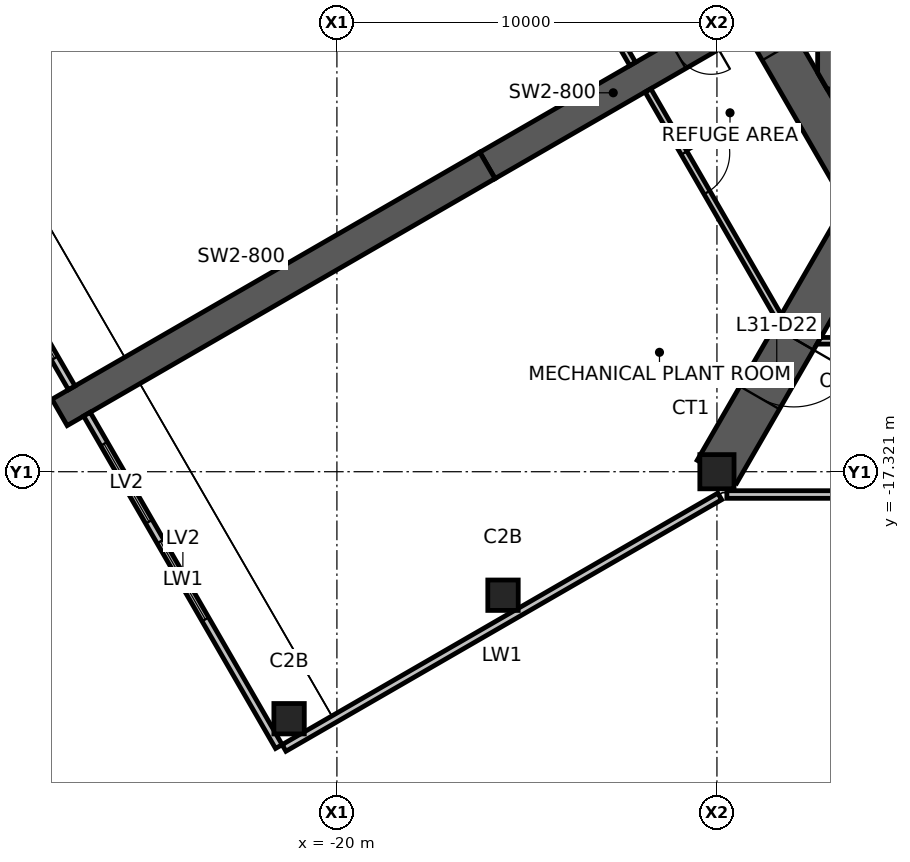
"""IFC4 building model, lengths in metres.
Left out: names, types, materials, properties, quantities, classifications, styles, units other than length and angle.
Written with IfcOpenShell. Run it as: python <this file> out.ifc"""

import sys

from ifc_helpers import new_model, si_unit, direction, frame, frame_2d, origin, origin_2d, place, context, subcontext, project, spatial, polyline, rectangle, hollow_rectangle, outline, extrude, element, fill, save


model = new_model("IFC4")
c1 = context("Model", 3, precision=1e-05, world=origin(), true_north=direction((0.0, 1.0)))
c2 = subcontext(c1, "Body", "Model", "MODEL_VIEW")
j1 = project(units=[si_unit("LENGTHUNIT", "METRE"), si_unit("PLANEANGLEUNIT", "RADIAN")], contexts=[c1])
p1 = place(None, origin())
s1 = spatial("IfcSite", under=j1, at=p1, CompositionType="ELEMENT")
p2 = place(p1, origin())
s2 = spatial("IfcBuilding", under=s1, at=p2, CompositionType="ELEMENT")
p3 = place(p2, frame((0.0, 0.0, 123.6)))
s3 = spatial("IfcBuildingStorey", under=s2, at=p3, CompositionType="ELEMENT", Elevation=123.6)
p4 = place(p3, frame((-10.0, -17.321, 0.0), z_axis=(0.0, 0.0, 1.0), x_axis=(1.0, 0.0, 0.0)))
e1 = element("IfcColumn", 1, at=p4, inside=s3, PredefinedType="COLUMN", context=c2, shape_type="SweptSolid", body=[
    extrude(hollow_rectangle(XDim=0.9, YDim=0.9, WallThickness=0.07, at=origin_2d()), origin(), (0.0, 0.0, 1.0), 5.0),
])
for number, where, z_axis, x_axis in (
    (2, (-15.629, -20.571, 0.0), (0.0, 0.0, 1.0), (1.0, 0.0, 0.0)),
    (3, (-21.258, -23.821, 0.0), (0.0, 0.0, 1.0), (1.0, 0.0, 0.0)),
):
    element("IfcColumn", number, at=place(p3, frame(where, z_axis=z_axis, x_axis=x_axis)), inside=s3, PredefinedType="COLUMN", context=c2, shape_type="SweptSolid", body=[
        extrude(hollow_rectangle(XDim=0.8, YDim=0.8, WallThickness=0.045, at=origin_2d()), origin(), (0.0, 0.0, 1.0), 5.0),
    ])
p5 = place(p3, frame((-11.922, 0.0, 0.0), z_axis=(0.0, 0.0, 1.0), x_axis=(0.500004296715, -0.866022923061, 0.0)))
e4 = element("IfcWall", 4, at=p5, inside=s3, PredefinedType="SHEAR", context=c2, shape_type="SweptSolid", body=[
    extrude(outline(polyline([(-0.318, -0.55), (6.381, -0.55), (7.181, -0.55), (12.24, -0.55), (11.605, 0.55), (7.181, 0.55), (6.381, 0.55), (0.318, 0.55), (-0.318, -0.55)])), origin(), (0.0, 0.0, 1.0), 5.0),
])
p6 = place(p5, frame((6.381, 0.0, 0.0)))
e5 = element("IfcOpeningElement", 5, at=p6, cuts=e4, PredefinedType="OPENING", context=c2, shape_type="SweptSolid", body=[
    extrude(rectangle(XDim=0.8, YDim=2.1, at=frame_2d((0.4, 1.05))), frame((0.0, 0.56, 0.0), z_axis=(0.0, -1.0, 0.0), x_axis=(1.0, 0.0, 0.0)), (0.0, 0.0, 1.0), 1.12),
])
p7 = place(p3, frame((-9.418, -5.438, 0.0), z_axis=(0.0, 0.0, 1.0), x_axis=(-0.866029782078, -0.499992416496, 0.0)))
e6 = element("IfcWall", 6, at=p7, inside=s3, PredefinedType="SHEAR", context=c2, shape_type="SweptSolid", body=[
    extrude(rectangle(XDim=7.646, YDim=0.8, at=frame_2d((3.823, 0.0))), origin(), (0.0, 0.0, 1.0), 5.0),
])
p8 = place(p7, frame((0.85, 0.0, 0.0)))
e7 = element("IfcOpeningElement", 7, at=p8, cuts=e6, PredefinedType="OPENING", context=c2, shape_type="SweptSolid", body=[
    extrude(rectangle(XDim=1.0, YDim=2.1, at=frame_2d((0.5, 1.05))), frame((0.0, 0.41, 0.0), z_axis=(0.0, -1.0, 0.0), x_axis=(1.0, 0.0, 0.0)), (0.0, 0.0, 1.0), 0.82),
])
p9 = place(p3, frame((-16.039, -9.26, 0.0), z_axis=(0.0, 0.0, 1.0), x_axis=(-0.866024837091, -0.50000098154, 0.0)))
e8 = element("IfcWall", 8, at=p9, inside=s3, PredefinedType="SHEAR", context=c2, shape_type="SweptSolid", body=[
    extrude(rectangle(XDim=13.0, YDim=0.8, at=frame_2d((6.5, 0.0))), origin(), (0.0, 0.0, 1.0), 5.0),
])
p10 = place(p3, frame((-6.279, -10.875, -1.15), z_axis=(0.0, 0.0, 1.0), x_axis=(-0.50000923905, -0.866020069551, 0.0)))
e9 = element("IfcWall", 9, at=p10, inside=s3, PredefinedType="SHEAR", context=c2, shape_type="SweptSolid", body=[
    extrude(outline(polyline([(-0.346, -0.6), (3.395, -0.6), (5.195, -0.6), (7.443, -0.6), (7.443, 0.6), (5.195, 0.6), (3.395, 0.6), (-0.346, 0.6), (0.0, 0.0), (-0.346, -0.6)])), origin(), (0.0, 0.0, 1.0), 6.15),
])
p11 = place(p10, frame((3.395, 0.0, 1.15)))
e10 = element("IfcOpeningElement", 10, at=p11, cuts=e9, PredefinedType="OPENING", context=c2, shape_type="SweptSolid", body=[
    extrude(rectangle(XDim=1.8, YDim=2.4, at=frame_2d((0.9, 1.2))), frame((0.0, 0.61, 0.0), z_axis=(0.0, -1.0, 0.0), x_axis=(1.0, 0.0, 0.0)), (0.0, 0.0, 1.0), 1.22),
])
p12 = place(p3, frame((-21.391, -24.59, 0.0), z_axis=(0.0, 0.0, 1.0), x_axis=(0.86602620781, 0.499998607384, 0.0)))
e11 = element("IfcWall", 11, at=p12, inside=s3, PredefinedType="ELEMENTEDWALL", context=c2, shape_type="SweptSolid", body=[
    extrude(rectangle(XDim=13.239, YDim=0.2, at=frame_2d((6.62, 0.0))), origin(), (0.0, 0.0, 1.0), 5.0),
])
p13 = place(p3, frame((-9.739, -17.92, 0.0), z_axis=(0.0, 0.0, 1.0), x_axis=(1.0, 0.0, 0.0)))
e12 = element("IfcWall", 12, at=p13, inside=s3, PredefinedType="ELEMENTEDWALL", context=c2, shape_type="SweptSolid", body=[
    extrude(rectangle(XDim=19.479, YDim=0.2, at=frame_2d((9.739, 0.0))), origin(), (0.0, 0.0, 1.0), 5.0),
])
p14 = place(p3, frame((-20.526, 0.389, 0.0), z_axis=(0.0, 0.0, 1.0), x_axis=(-0.86602620781, -0.499998607384, 0.0)))
e13 = element("IfcWall", 13, at=p14, inside=s3, PredefinedType="ELEMENTEDWALL", context=c2, shape_type="SweptSolid", body=[
    extrude(rectangle(XDim=13.239, YDim=0.2, at=frame_2d((6.62, 0.0))), origin(), (0.0, 0.0, 1.0), 5.0),
])
p15 = place(p3, frame((-32.028, -6.367, 0.0), z_axis=(0.0, 0.0, 1.0), x_axis=(0.499986799974, -0.866033024689, 0.0)))
e14 = element("IfcWall", 14, at=p15, inside=s3, PredefinedType="ELEMENTEDWALL", context=c2, shape_type="SweptSolid", body=[
    extrude(rectangle(XDim=10.1, YDim=0.2, at=frame_2d((5.05, 0.0))), origin(), (0.0, 0.0, 1.0), 5.0),
])
p16 = place(p15, frame((3.867, 0.0, 0.6)))
e15 = element("IfcOpeningElement", 15, at=p16, cuts=e14, PredefinedType="OPENING", context=c2, shape_type="SweptSolid", body=[
    extrude(rectangle(XDim=2.367, YDim=3.6, at=frame_2d((1.183, 1.8))), frame((0.0, 0.11, 0.0), z_axis=(0.0, -1.0, 0.0), x_axis=(1.0, 0.0, 0.0)), (0.0, 0.0, 1.0), 0.22),
])
p17 = place(p15, frame((6.833, 0.0, 0.6)))
e16 = element("IfcOpeningElement", 16, at=p17, cuts=e14, PredefinedType="OPENING", context=c2, shape_type="SweptSolid", body=[
    extrude(rectangle(XDim=2.367, YDim=3.6, at=frame_2d((1.183, 1.8))), frame((0.0, 0.11, 0.0), z_axis=(0.0, -1.0, 0.0), x_axis=(1.0, 0.0, 0.0)), (0.0, 0.0, 1.0), 0.22),
])
p18 = place(p3, frame((-26.578, -15.807, 0.0), z_axis=(0.0, 0.0, 1.0), x_axis=(0.500004929441, -0.866022557752, 0.0)))
e17 = element("IfcWall", 17, at=p18, inside=s3, PredefinedType="ELEMENTEDWALL", context=c2, shape_type="SweptSolid", body=[
    extrude(rectangle(XDim=10.1, YDim=0.2, at=frame_2d((5.05, 0.0))), origin(), (0.0, 0.0, 1.0), 5.0),
])
p19 = place(p18, frame((0.9, 0.0, 0.6)))
e18 = element("IfcOpeningElement", 18, at=p19, cuts=e17, PredefinedType="OPENING", context=c2, shape_type="SweptSolid", body=[
    extrude(rectangle(XDim=2.367, YDim=3.6, at=frame_2d((1.183, 1.8))), frame((0.0, 0.11, 0.0), z_axis=(0.0, -1.0, 0.0), x_axis=(1.0, 0.0, 0.0)), (0.0, 0.0, 1.0), 0.22),
])
p20 = place(p18, frame((3.867, 0.0, 0.6)))
e19 = element("IfcOpeningElement", 19, at=p20, cuts=e17, PredefinedType="OPENING", context=c2, shape_type="SweptSolid", body=[
    extrude(rectangle(XDim=2.367, YDim=3.6, at=frame_2d((1.183, 1.8))), frame((0.0, 0.11, 0.0), z_axis=(0.0, -1.0, 0.0), x_axis=(1.0, 0.0, 0.0)), (0.0, 0.0, 1.0), 0.22),
])
p21 = place(p3, frame((-7.1, -3.85, 0.0), z_axis=(0.0, 0.0, 1.0), x_axis=(0.0, -1.0, 0.0)))
e20 = element("IfcWall", 20, at=p21, inside=s3, PredefinedType="SHEAR", context=c2, shape_type="SweptSolid", body=[
    extrude(outline(polyline([(0.0, -0.25), (2.969, -0.25), (3.4, 0.0), (3.4, 0.25), (0.0, 0.25), (0.0, -0.25)])), origin(), (0.0, 0.0, 1.0), 5.0),
])
p22 = place(p3, frame((-15.675, -0.6, 0.0), z_axis=(0.0, 0.0, 1.0), x_axis=(0.500005739714, -0.866022089933, 0.0)))
e21 = element("IfcWall", 21, at=p22, inside=s3, PredefinedType="PARTITIONING", context=c2, shape_type="SweptSolid", body=[
    extrude(outline(polyline([(-0.051, -0.087), (6.913, -0.087), (6.913, 0.087), (0.051, 0.087), (-0.051, -0.087)])), origin(), (0.0, 0.0, 1.0), 4.8),
])
p23 = place(p3, frame((-11.814, -7.288, 0.0), z_axis=(0.0, 0.0, 1.0), x_axis=(0.500005739714, -0.866022089933, 0.0)))
e22 = element("IfcWall", 22, at=p23, inside=s3, PredefinedType="PARTITIONING", context=c2, shape_type="SweptSolid", body=[
    extrude(outline(polyline([(0.0, -0.087), (1.9, -0.087), (3.1, -0.087), (6.964, -0.087), (6.863, 0.087), (3.1, 0.087), (1.9, 0.087), (0.0, 0.087), (0.0, -0.087)])), origin(), (0.0, 0.0, 1.0), 4.8),
])
p24 = place(p23, frame((1.9, 0.0, 0.0)))
e23 = element("IfcOpeningElement", 23, at=p24, cuts=e22, PredefinedType="OPENING", context=c2, shape_type="SweptSolid", body=[
    extrude(rectangle(XDim=1.2, YDim=2.1, at=frame_2d((0.6, 1.05))), frame((0.0, 0.098, 0.0), z_axis=(0.0, -1.0, 0.0), x_axis=(1.0, 0.0, 0.0)), (0.0, 0.0, 1.0), 0.195),
])
p25 = place(p3, frame((-7.318, -13.875, 0.0), z_axis=(0.0, 0.0, 1.0), x_axis=(1.0, 0.0, 0.0)))
e24 = element("IfcWall", 24, at=p25, inside=s3, PredefinedType="PARTITIONING", context=c2, shape_type="SweptSolid", body=[
    extrude(outline(polyline([(-0.051, -0.087), (1.213, -0.087), (2.413, -0.087), (14.686, -0.087), (14.585, 0.087), (2.413, 0.087), (1.213, 0.087), (0.051, 0.087), (-0.051, -0.087)])), origin(), (0.0, 0.0, 1.0), 4.8),
])
p26 = place(p25, frame((1.213, 0.0, 0.0)))
e25 = element("IfcOpeningElement", 25, at=p26, cuts=e24, PredefinedType="OPENING", context=c2, shape_type="SweptSolid", body=[
    extrude(rectangle(XDim=1.2, YDim=2.1, at=frame_2d((0.6, 1.05))), frame((0.0, 0.098, 0.0), z_axis=(0.0, -1.0, 0.0), x_axis=(1.0, 0.0, 0.0)), (0.0, 0.0, 1.0), 0.195),
])
p27 = place(p17, origin())
e26 = element("IfcWindow", 26, at=p27, inside=s3, PartitioningType="SINGLE_PANEL", PredefinedType="USERDEFINED", context=c2, shape_type="SweptSolid", body=[
    extrude(rectangle(XDim=2.367, YDim=3.6, at=frame_2d((1.183, 1.8))), frame((0.0, 0.03, 0.0), z_axis=(0.0, -1.0, 0.0), x_axis=(1.0, 0.0, 0.0)), (0.0, 0.0, 1.0), 0.06),
])
fill(e16, e26)
p28 = place(p19, origin())
e27 = element("IfcWindow", 27, at=p28, inside=s3, PartitioningType="SINGLE_PANEL", PredefinedType="USERDEFINED", context=c2, shape_type="SweptSolid", body=[
    extrude(rectangle(XDim=2.367, YDim=3.6, at=frame_2d((1.183, 1.8))), frame((0.0, 0.03, 0.0), z_axis=(0.0, -1.0, 0.0), x_axis=(1.0, 0.0, 0.0)), (0.0, 0.0, 1.0), 0.06),
])
fill(e18, e27)
p29 = place(p20, origin())
e28 = element("IfcWindow", 28, at=p29, inside=s3, PartitioningType="SINGLE_PANEL", PredefinedType="USERDEFINED", context=c2, shape_type="SweptSolid", body=[
    extrude(rectangle(XDim=2.367, YDim=3.6, at=frame_2d((1.183, 1.8))), frame((0.0, 0.03, 0.0), z_axis=(0.0, -1.0, 0.0), x_axis=(1.0, 0.0, 0.0)), (0.0, 0.0, 1.0), 0.06),
])
fill(e19, e28)
p30 = place(p8, origin())
e29 = element("IfcDoor", 29, at=p30, inside=s3, OperationType="SINGLE_SWING_LEFT", PredefinedType="DOOR", context=c2, shape_type="SweptSolid", body=[
    extrude(rectangle(XDim=1.0, YDim=2.1, at=frame_2d((0.5, 1.05))), frame((0.0, 0.025, 0.0), z_axis=(0.0, -1.0, 0.0), x_axis=(1.0, 0.0, 0.0)), (0.0, 0.0, 1.0), 0.05),
])
fill(e7, e29)
p31 = place(p11, origin())
e30 = element("IfcDoor", 30, at=p31, inside=s3, OperationType="DOUBLE_DOOR_SINGLE_SWING", PredefinedType="DOOR", context=c2, shape_type="SweptSolid", body=[
    extrude(rectangle(XDim=1.8, YDim=2.4, at=frame_2d((0.9, 1.2))), frame((0.0, 0.025, 0.0), z_axis=(0.0, -1.0, 0.0), x_axis=(1.0, 0.0, 0.0)), (0.0, 0.0, 1.0), 0.05),
])
fill(e10, e30)
p32 = place(p24, origin())
e31 = element("IfcDoor", 31, at=p32, inside=s3, OperationType="DOUBLE_DOOR_SINGLE_SWING", PredefinedType="DOOR", context=c2, shape_type="SweptSolid", body=[
    extrude(rectangle(XDim=1.2, YDim=2.1, at=frame_2d((0.6, 1.05))), frame((0.0, 0.025, 0.0), z_axis=(0.0, -1.0, 0.0), x_axis=(1.0, 0.0, 0.0)), (0.0, 0.0, 1.0), 0.05),
])
fill(e23, e31)
save(model, sys.argv[1])
